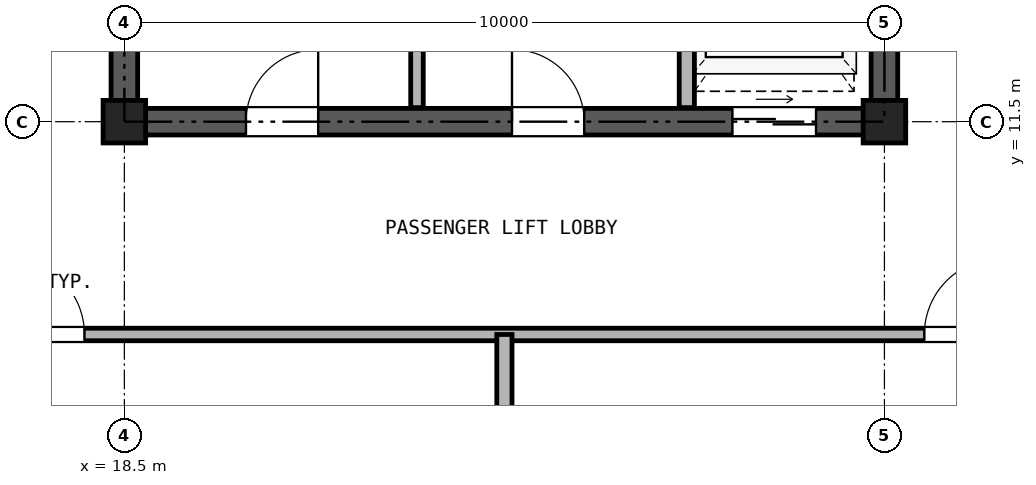
"""IFC4 building model, lengths in metres.
Left out: names, types, materials, properties, quantities, classifications, styles, units other than length and angle.
Written with IfcOpenShell. Run it as: python <this file> out.ifc"""

import sys

from ifc_helpers import new_model, si_unit, direction, frame, frame_2d, origin, origin_2d, place, context, subcontext, project, spatial, rectangle, hollow_rectangle, extrude, source, transform, mapped, element, fill, save


model = new_model("IFC4")
c1 = context("Model", 3, precision=1e-05, world=origin(), true_north=direction((0.0, 1.0)))
c2 = subcontext(c1, "Body", "Model", "MODEL_VIEW")
j1 = project(units=[si_unit("LENGTHUNIT", "METRE"), si_unit("PLANEANGLEUNIT", "RADIAN")], contexts=[c1])
p1 = place(None, origin())
s1 = spatial("IfcSite", under=j1, at=p1, CompositionType="ELEMENT")
p2 = place(p1, origin())
s2 = spatial("IfcBuilding", under=s1, at=p2, CompositionType="ELEMENT")
p3 = place(p2, frame((0.0, 0.0, 239.3)))
s3 = spatial("IfcBuildingStorey", under=s2, at=p3, CompositionType="ELEMENT", Elevation=239.3)
m1 = source(origin(), c2, "Body", "SweptSolid", [
    extrude(hollow_rectangle(XDim=0.56, YDim=0.56, WallThickness=0.03, at=origin_2d()), origin(), (0.0, 0.0, 1.0), 2.98),
])
for number, where, z_axis, x_axis in (
    (1, (18.5, 11.5, 0.0), (0.0, 0.0, 1.0), (1.0, 0.0, 0.0)),
    (2, (28.5, 11.5, 0.0), (0.0, 0.0, 1.0), (1.0, 0.0, 0.0)),
):
    element("IfcColumn", number, at=place(p3, frame(where, z_axis=z_axis, x_axis=x_axis)), inside=s3, PredefinedType="COLUMN", context=c2, shape_type="MappedRepresentation", body=[
        mapped(m1, transform((0.0, 0.0, 0.0), x_axis=(1.0, 0.0, 0.0), y_axis=(0.0, 1.0, 0.0), z_axis=(0.0, 0.0, 1.0), scale=1.0)),
    ])
p4 = place(p3, frame((18.325, 11.5, 0.0), z_axis=(0.0, 0.0, 1.0), x_axis=(1.0, 0.0, 0.0)))
e3 = element("IfcWall", 3, at=p4, inside=s3, PredefinedType="SHEAR", context=c2, shape_type="SweptSolid", body=[
    extrude(rectangle(XDim=10.35, YDim=0.35, at=frame_2d((5.175, 0.0))), origin(), (0.0, 0.0, 1.0), 2.98),
])
p5 = place(p4, frame((1.775, 0.0, 0.0)))
e4 = element("IfcOpeningElement", 4, at=p5, cuts=e3, PredefinedType="OPENING", context=c2, shape_type="SweptSolid", body=[
    extrude(rectangle(XDim=0.95, YDim=2.15, at=frame_2d((0.475, 1.075))), frame((0.0, 0.185, 0.0), z_axis=(0.0, -1.0, 0.0), x_axis=(1.0, 0.0, 0.0)), (0.0, 0.0, 1.0), 0.37),
])
p6 = place(p4, frame((5.275, 0.0, 0.0)))
e5 = element("IfcOpeningElement", 5, at=p6, cuts=e3, PredefinedType="OPENING", context=c2, shape_type="SweptSolid", body=[
    extrude(rectangle(XDim=0.95, YDim=2.15, at=frame_2d((0.475, 1.075))), frame((0.0, 0.185, 0.0), z_axis=(0.0, -1.0, 0.0), x_axis=(1.0, 0.0, 0.0)), (0.0, 0.0, 1.0), 0.37),
])
p7 = place(p4, frame((8.175, 0.0, 0.0)))
e6 = element("IfcOpeningElement", 6, at=p7, cuts=e3, PredefinedType="OPENING", context=c2, shape_type="SweptSolid", body=[
    extrude(rectangle(XDim=1.1, YDim=2.25, at=frame_2d((0.55, 1.125))), frame((0.0, 0.185, 0.0), z_axis=(0.0, -1.0, 0.0), x_axis=(1.0, 0.0, 0.0)), (0.0, 0.0, 1.0), 0.37),
])
p8 = place(p3, frame((18.5, 11.675, 0.0), z_axis=(0.0, 0.0, 1.0), x_axis=(0.0, 1.0, 0.0)))
e7 = element("IfcWall", 7, at=p8, inside=s3, PredefinedType="SHEAR", context=c2, shape_type="SweptSolid", body=[
    extrude(rectangle(XDim=16.9, YDim=0.35, at=frame_2d((8.45, 0.0))), origin(), (0.0, 0.0, 1.0), 2.98),
])
p9 = place(p8, frame((7.475, 0.0, 0.0)))
e8 = element("IfcOpeningElement", 8, at=p9, cuts=e7, PredefinedType="OPENING", context=c2, shape_type="SweptSolid", body=[
    extrude(rectangle(XDim=1.15, YDim=2.2, at=frame_2d((0.575, 1.1))), frame((0.0, 0.185, 0.0), z_axis=(0.0, -1.0, 0.0), x_axis=(1.0, 0.0, 0.0)), (0.0, 0.0, 1.0), 0.37),
])
p10 = place(p3, frame((28.5, 11.675, 0.0), z_axis=(0.0, 0.0, 1.0), x_axis=(0.0, 1.0, 0.0)))
e9 = element("IfcWall", 9, at=p10, inside=s3, PredefinedType="SHEAR", context=c2, shape_type="SweptSolid", body=[
    extrude(rectangle(XDim=16.9, YDim=0.35, at=frame_2d((8.45, 0.0))), origin(), (0.0, 0.0, 1.0), 2.98),
])
p11 = place(p10, frame((7.475, 0.0, 0.0)))
e10 = element("IfcOpeningElement", 10, at=p11, cuts=e9, PredefinedType="OPENING", context=c2, shape_type="SweptSolid", body=[
    extrude(rectangle(XDim=1.15, YDim=2.2, at=frame_2d((0.575, 1.1))), frame((0.0, 0.185, 0.0), z_axis=(0.0, -1.0, 0.0), x_axis=(1.0, 0.0, 0.0)), (0.0, 0.0, 1.0), 0.37),
])
p12 = place(p3, frame((22.35, 11.685, 0.0), z_axis=(0.0, 0.0, 1.0), x_axis=(0.0, 1.0, 0.0)))
e11 = element("IfcWall", 11, at=p12, inside=s3, PredefinedType="PARTITIONING", context=c2, shape_type="SweptSolid", body=[
    extrude(rectangle(XDim=3.315, YDim=0.165, at=frame_2d((1.657, 0.0))), origin(), (0.0, 0.0, 1.0), 2.98),
])
p13 = place(p3, frame((25.9, 11.685, 0.0), z_axis=(0.0, 0.0, 1.0), x_axis=(0.0, 1.0, 0.0)))
e12 = element("IfcWall", 12, at=p13, inside=s3, PredefinedType="PARTITIONING", context=c2, shape_type="SweptSolid", body=[
    extrude(rectangle(XDim=3.315, YDim=0.2, at=frame_2d((1.657, 0.0))), origin(), (0.0, 0.0, 1.0), 2.98),
])
p14 = place(p3, frame((5.36, 8.7, 0.0), z_axis=(0.0, 0.0, 1.0), x_axis=(1.0, 0.0, 0.0)))
e13 = element("IfcWall", 13, at=p14, inside=s3, PredefinedType="PARTITIONING", context=c2, shape_type="SweptSolid", body=[
    extrude(rectangle(XDim=36.28, YDim=0.165, at=frame_2d((18.14, 0.0))), origin(), (0.0, 0.0, 1.0), 2.655),
])
p15 = place(p14, frame((11.615, 0.0, 0.0)))
e14 = element("IfcOpeningElement", 14, at=p15, cuts=e13, PredefinedType="OPENING", context=c2, shape_type="SweptSolid", body=[
    extrude(rectangle(XDim=1.0, YDim=2.15, at=frame_2d((0.5, 1.075))), frame((0.0, 0.093, 0.0), z_axis=(0.0, -1.0, 0.0), x_axis=(1.0, 0.0, 0.0)), (0.0, 0.0, 1.0), 0.185),
])
p16 = place(p14, frame((23.665, 0.0, 0.0)))
e15 = element("IfcOpeningElement", 15, at=p16, cuts=e13, PredefinedType="OPENING", context=c2, shape_type="SweptSolid", body=[
    extrude(rectangle(XDim=1.0, YDim=2.15, at=frame_2d((0.5, 1.075))), frame((0.0, 0.093, 0.0), z_axis=(0.0, -1.0, 0.0), x_axis=(1.0, 0.0, 0.0)), (0.0, 0.0, 1.0), 0.185),
])
p17 = place(p3, frame((23.5, 0.16, 0.0), z_axis=(0.0, 0.0, 1.0), x_axis=(0.0, 1.0, 0.0)))
e16 = element("IfcWall", 16, at=p17, inside=s3, PredefinedType="PARTITIONING", context=c2, shape_type="SweptSolid", body=[
    extrude(rectangle(XDim=8.54, YDim=0.2, at=frame_2d((4.27, 0.0))), origin(), (0.0, 0.0, 1.0), 2.98),
])
p18 = place(p5, frame((0.95, 0.0, 0.0), z_axis=(0.0, 0.0, 1.0), x_axis=(-1.0, 0.0, 0.0)))
e17 = element("IfcDoor", 17, at=p18, inside=s3, OperationType="SINGLE_SWING_RIGHT", PredefinedType="DOOR", context=c2, shape_type="SweptSolid", body=[
    extrude(rectangle(XDim=0.95, YDim=2.15, at=frame_2d((0.475, 1.075))), frame((0.0, 0.025, 0.0), z_axis=(0.0, -1.0, 0.0), x_axis=(1.0, 0.0, 0.0)), (0.0, 0.0, 1.0), 0.05),
])
fill(e4, e17)
p19 = place(p6, frame((0.95, 0.0, 0.0), z_axis=(0.0, 0.0, 1.0), x_axis=(-1.0, 0.0, 0.0)))
e18 = element("IfcDoor", 18, at=p19, inside=s3, OperationType="SINGLE_SWING_LEFT", PredefinedType="DOOR", context=c2, shape_type="SweptSolid", body=[
    extrude(rectangle(XDim=0.95, YDim=2.15, at=frame_2d((0.475, 1.075))), frame((0.0, 0.025, 0.0), z_axis=(0.0, -1.0, 0.0), x_axis=(1.0, 0.0, 0.0)), (0.0, 0.0, 1.0), 0.05),
])
fill(e5, e18)
p20 = place(p7, frame((1.1, 0.0, 0.0), z_axis=(0.0, 0.0, 1.0), x_axis=(-1.0, 0.0, 0.0)))
e19 = element("IfcDoor", 19, at=p20, inside=s3, OperationType="DOUBLE_DOOR_SLIDING", PredefinedType="DOOR", context=c2, shape_type="SweptSolid", body=[
    extrude(rectangle(XDim=1.1, YDim=2.25, at=frame_2d((0.55, 1.125))), frame((0.0, 0.025, 0.0), z_axis=(0.0, -1.0, 0.0), x_axis=(1.0, 0.0, 0.0)), (0.0, 0.0, 1.0), 0.05),
])
fill(e6, e19)
p21 = place(p15, frame((1.0, 0.0, 0.0), z_axis=(0.0, 0.0, 1.0), x_axis=(-1.0, 0.0, 0.0)))
e20 = element("IfcDoor", 20, at=p21, inside=s3, OperationType="SINGLE_SWING_LEFT", PredefinedType="DOOR", context=c2, shape_type="SweptSolid", body=[
    extrude(rectangle(XDim=1.0, YDim=2.15, at=frame_2d((0.5, 1.075))), frame((0.0, 0.025, 0.0), z_axis=(0.0, -1.0, 0.0), x_axis=(1.0, 0.0, 0.0)), (0.0, 0.0, 1.0), 0.05),
])
fill(e14, e20)
p22 = place(p16, frame((1.0, 0.0, 0.0), z_axis=(0.0, 0.0, 1.0), x_axis=(-1.0, 0.0, 0.0)))
e21 = element("IfcDoor", 21, at=p22, inside=s3, OperationType="SINGLE_SWING_RIGHT", PredefinedType="DOOR", context=c2, shape_type="SweptSolid", body=[
    extrude(rectangle(XDim=1.0, YDim=2.15, at=frame_2d((0.5, 1.075))), frame((0.0, 0.025, 0.0), z_axis=(0.0, -1.0, 0.0), x_axis=(1.0, 0.0, 0.0)), (0.0, 0.0, 1.0), 0.05),
])
fill(e15, e21)
save(model, sys.argv[1])
